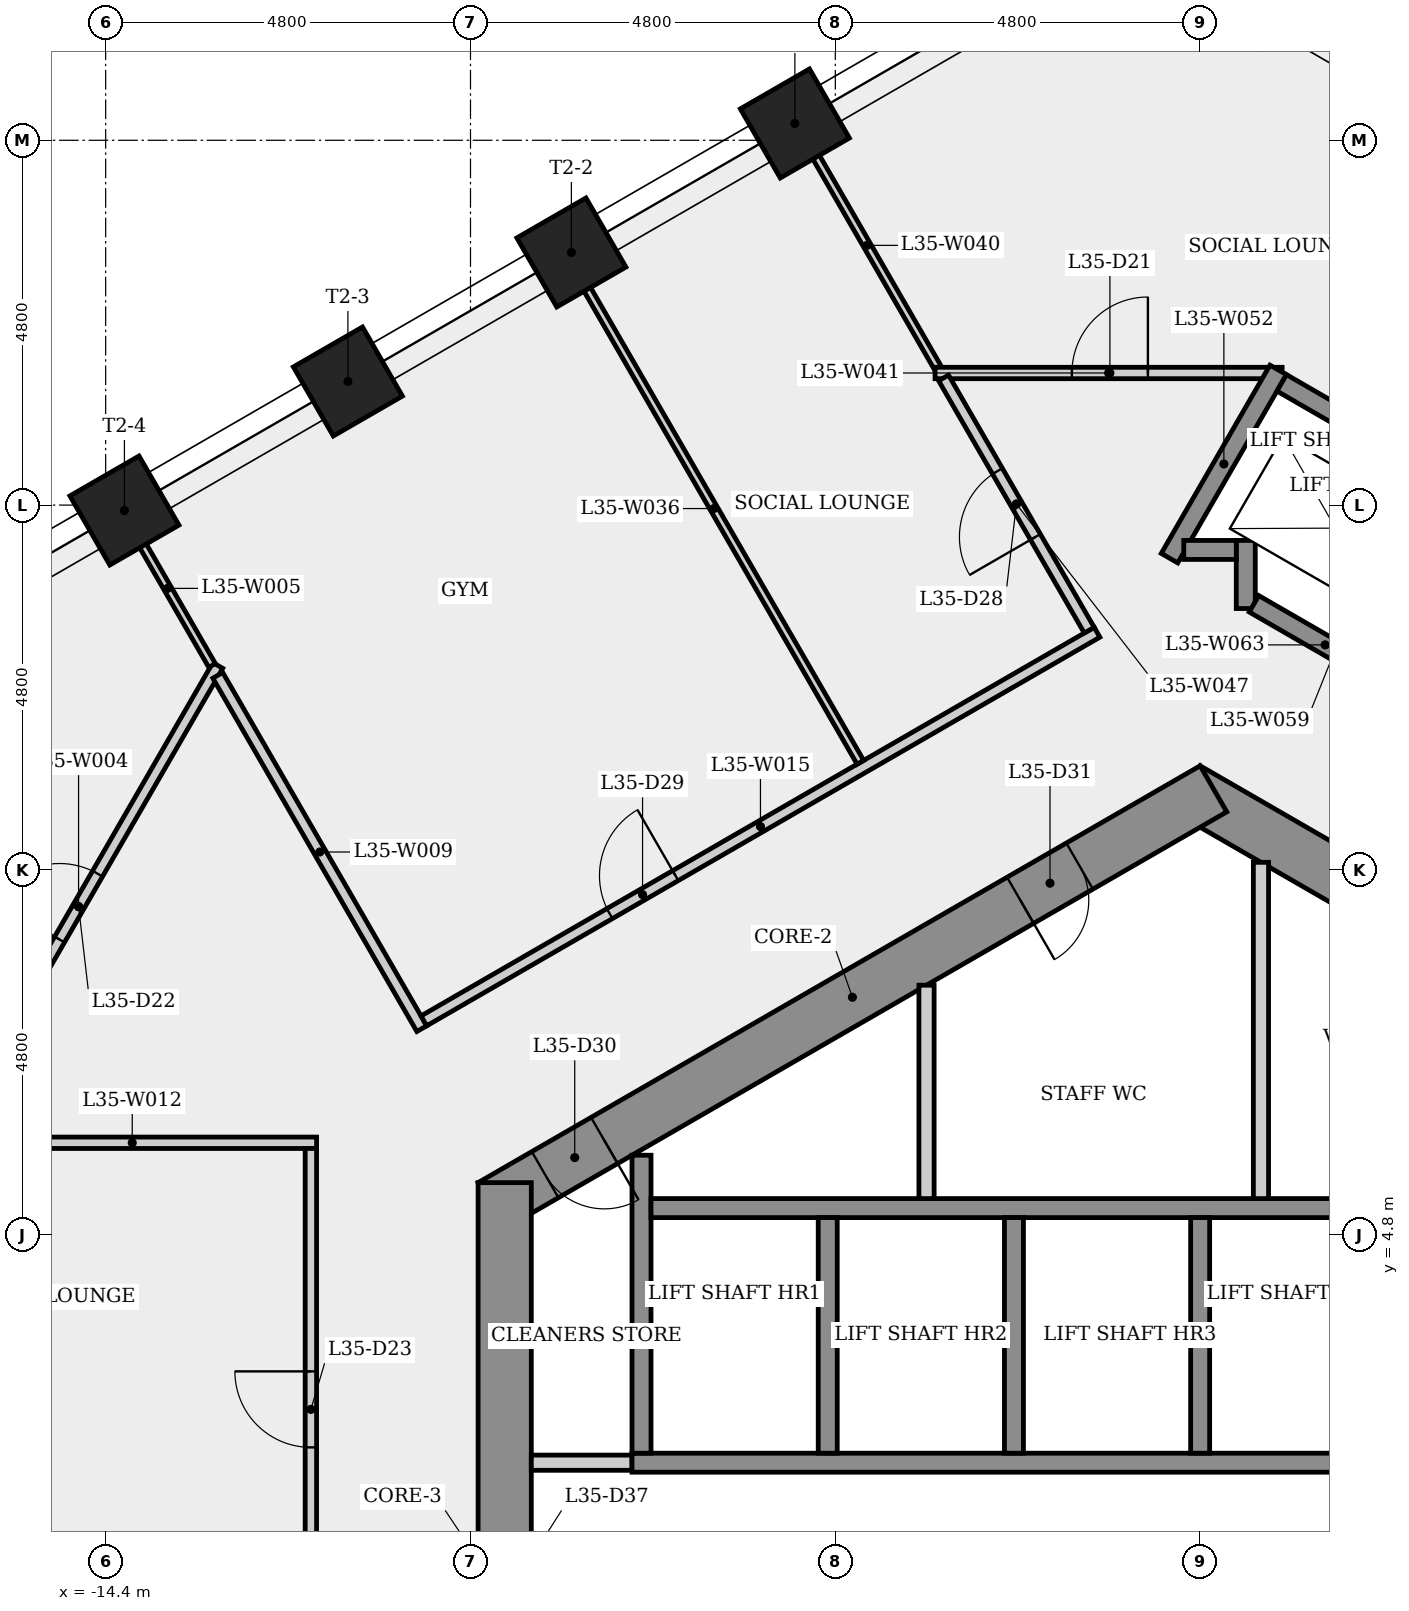
"""IFC4 building model, lengths in metres.
Left out: names, types, materials, properties, quantities, classifications, styles, units other than length and angle.
Written with IfcOpenShell. Run it as: python <this file> out.ifc"""

import sys

from ifc_helpers import new_model, si_unit, direction, frame, frame_2d, origin, origin_2d, place, context, subcontext, project, spatial, rectangle, extrude, element, fill, save


model = new_model("IFC4")
c1 = context("Model", 3, precision=1e-05, world=origin(), true_north=direction((0.0, 1.0)))
c2 = subcontext(c1, "Body", "Model", "MODEL_VIEW")
j1 = project(units=[si_unit("LENGTHUNIT", "METRE"), si_unit("PLANEANGLEUNIT", "RADIAN")], contexts=[c1])
p1 = place(None, origin())
s1 = spatial("IfcSite", under=j1, at=p1, CompositionType="ELEMENT")
p2 = place(p1, origin())
s2 = spatial("IfcBuilding", under=s1, at=p2, CompositionType="ELEMENT")
p3 = place(p2, frame((0.0, 0.0, 132.5)))
s3 = spatial("IfcBuildingStorey", under=s2, at=p3, CompositionType="ELEMENT", Elevation=132.5)
p4 = place(p3, frame((9.325, 5.182, 0.0), z_axis=(0.0, 0.0, 1.0), x_axis=(-0.866023993627, 0.500002442456, 0.0)))
e1 = element("IfcWall", 1, at=p4, inside=s3, PredefinedType="SHEAR", context=c2, shape_type="SweptSolid", body=[
    extrude(rectangle(XDim=10.97, YDim=0.7, at=frame_2d((5.485, 0.0))), origin(), (0.0, 0.0, 1.0), 3.4),
])
p5 = place(p4, frame((2.933, 0.0, 0.0)))
e2 = element("IfcOpeningElement", 2, at=p5, cuts=e1, PredefinedType="OPENING", context=c2, shape_type="SweptSolid", body=[
    extrude(rectangle(XDim=0.9, YDim=2.1, at=frame_2d((0.45, 1.05))), frame((0.0, 0.36, 0.0), z_axis=(0.0, -1.0, 0.0), x_axis=(1.0, 0.0, 0.0)), (0.0, 0.0, 1.0), 0.72),
])
p6 = place(p3, frame((0.175, 10.667, 0.0), z_axis=(0.0, 0.0, 1.0), x_axis=(-0.866023993627, -0.500002442456, 0.0)))
e3 = element("IfcWall", 3, at=p6, inside=s3, PredefinedType="SHEAR", context=c2, shape_type="SweptSolid", body=[
    extrude(rectangle(XDim=10.97, YDim=0.7, at=frame_2d((5.485, 0.0))), origin(), (0.0, 0.0, 1.0), 3.4),
])
p7 = place(p6, frame((9.254, 0.0, 0.0)))
e4 = element("IfcOpeningElement", 4, at=p7, cuts=e3, PredefinedType="OPENING", context=c2, shape_type="SweptSolid", body=[
    extrude(rectangle(XDim=0.9, YDim=2.1, at=frame_2d((0.45, 1.05))), frame((0.0, 0.36, 0.0), z_axis=(0.0, -1.0, 0.0), x_axis=(1.0, 0.0, 0.0)), (0.0, 0.0, 1.0), 0.72),
])
p8 = place(p6, frame((2.033, 0.0, 0.0)))
e5 = element("IfcOpeningElement", 5, at=p8, cuts=e3, PredefinedType="OPENING", context=c2, shape_type="SweptSolid", body=[
    extrude(rectangle(XDim=0.9, YDim=2.1, at=frame_2d((0.45, 1.05))), frame((0.0, 0.36, 0.0), z_axis=(0.0, -1.0, 0.0), x_axis=(1.0, 0.0, 0.0)), (0.0, 0.0, 1.0), 0.72),
])
p9 = place(p3, frame((-9.15, 5.485, 0.0), z_axis=(0.0, 0.0, 1.0), x_axis=(0.0, -1.0, 0.0)))
e6 = element("IfcWall", 6, at=p9, inside=s3, PredefinedType="SHEAR", context=c2, shape_type="SweptSolid", body=[
    extrude(rectangle(XDim=10.97, YDim=0.7, at=frame_2d((5.485, 0.0))), origin(), (0.0, 0.0, 1.0), 3.4),
])
p10 = place(p9, frame((4.685, 0.0, 0.0)))
e7 = element("IfcOpeningElement", 7, at=p10, cuts=e6, PredefinedType="OPENING", context=c2, shape_type="SweptSolid", body=[
    extrude(rectangle(XDim=1.6, YDim=2.1, at=frame_2d((0.8, 1.05))), frame((0.0, 0.36, 0.0), z_axis=(0.0, -1.0, 0.0), x_axis=(1.0, 0.0, 0.0)), (0.0, 0.0, 1.0), 0.72),
])
for number, where, z_axis, x_axis in (
    (8, (-5.332, 19.421, 0.0), (0.0, 0.0, 1.0), (-0.5, 0.866, 0.0)),
    (9, (-8.273, 17.724, 0.0), (0.0, 0.0, 1.0), (-0.5, 0.866, 0.0)),
    (10, (-11.213, 16.026, 0.0), (0.0, 0.0, 1.0), (-0.5, 0.866, 0.0)),
    (11, (-14.153, 14.329, 0.0), (0.0, 0.0, 1.0), (-0.5, 0.866, 0.0)),
):
    element("IfcColumn", number, at=place(p3, frame(where, z_axis=z_axis, x_axis=x_axis)), inside=s3, PredefinedType="COLUMN", context=c2, shape_type="SweptSolid", body=[
        extrude(rectangle(XDim=1.05, YDim=1.05, at=origin_2d()), origin(), (0.0, 0.0, 1.0), 3.4),
    ])
p11 = place(p3, frame((-16.588, 5.945, 0.0), z_axis=(0.0, 0.0, 1.0), x_axis=(0.500006094381, 0.866021885163, 0.0)))
e12 = element("IfcWall", 12, at=p11, inside=s3, PredefinedType="PARTITIONING", context=c2, shape_type="SweptSolid", body=[
    extrude(rectangle(XDim=7.327, YDim=0.15, at=frame_2d((3.663, 0.0))), origin(), (0.0, 0.0, 1.0), 3.0),
])
p12 = place(p11, frame((3.163, 0.0, 0.0)))
e13 = element("IfcOpeningElement", 13, at=p12, cuts=e12, PredefinedType="OPENING", context=c2, shape_type="SweptSolid", body=[
    extrude(rectangle(XDim=1.0, YDim=2.1, at=frame_2d((0.5, 1.05))), frame((0.0, 0.085, 0.0), z_axis=(0.0, -1.0, 0.0), x_axis=(1.0, 0.0, 0.0)), (0.0, 0.0, 1.0), 0.17),
])
p13 = place(p3, frame((-14.171, 14.318, 0.0), z_axis=(0.0, 0.0, 1.0), x_axis=(0.500017137554, -0.866015509187, 0.0)))
e14 = element("IfcWall", 14, at=p13, inside=s3, PredefinedType="PARTITIONING", context=c2, shape_type="SweptSolid", body=[
    extrude(rectangle(XDim=2.343, YDim=0.1, at=frame_2d((1.171, 0.0))), origin(), (0.0, 0.0, 1.0), 3.0),
])
p14 = place(p3, frame((-12.925, 12.16, 0.0), z_axis=(0.0, 0.0, 1.0), x_axis=(0.500022974468, -0.866012139063, 0.0)))
e15 = element("IfcWall", 15, at=p14, inside=s3, PredefinedType="PARTITIONING", context=c2, shape_type="SweptSolid", body=[
    extrude(rectangle(XDim=5.368, YDim=0.15, at=frame_2d((2.684, 0.0))), origin(), (0.0, 0.0, 1.0), 3.0),
])
p15 = place(p3, frame((-11.625, 6.01, 0.0), z_axis=(0.0, 0.0, 1.0), x_axis=(-1.0, 0.0, 0.0)))
e16 = element("IfcWall", 16, at=p15, inside=s3, PredefinedType="PARTITIONING", context=c2, shape_type="SweptSolid", body=[
    extrude(rectangle(XDim=4.851, YDim=0.15, at=frame_2d((2.425, 0.0))), origin(), (0.0, 0.0, 1.0), 3.0),
])
p16 = place(p3, frame((-11.7, -6.01, 0.0), z_axis=(0.0, 0.0, 1.0), x_axis=(0.0, 1.0, 0.0)))
e17 = element("IfcWall", 17, at=p16, inside=s3, PredefinedType="PARTITIONING", context=c2, shape_type="SweptSolid", body=[
    extrude(rectangle(XDim=11.944, YDim=0.15, at=frame_2d((5.972, 0.0))), origin(), (0.0, 0.0, 1.0), 3.0),
])
p17 = place(p16, frame((8.011, 0.0, 0.0)))
e18 = element("IfcOpeningElement", 18, at=p17, cuts=e17, PredefinedType="OPENING", context=c2, shape_type="SweptSolid", body=[
    extrude(rectangle(XDim=1.0, YDim=2.1, at=frame_2d((0.5, 1.05))), frame((0.0, 0.085, 0.0), z_axis=(0.0, -1.0, 0.0), x_axis=(1.0, 0.0, 0.0)), (0.0, 0.0, 1.0), 0.17),
])
p18 = place(p16, frame((2.009, 0.0, 0.0)))
e19 = element("IfcOpeningElement", 19, at=p18, cuts=e17, PredefinedType="OPENING", context=c2, shape_type="SweptSolid", body=[
    extrude(rectangle(XDim=1.0, YDim=2.1, at=frame_2d((0.5, 1.05))), frame((0.0, 0.085, 0.0), z_axis=(0.0, -1.0, 0.0), x_axis=(1.0, 0.0, 0.0)), (0.0, 0.0, 1.0), 0.17),
])
p19 = place(p3, frame((-10.213, 7.613, 0.0), z_axis=(0.0, 0.0, 1.0), x_axis=(0.866020604402, 0.500008312683, 0.0)))
e20 = element("IfcWall", 20, at=p19, inside=s3, PredefinedType="PARTITIONING", context=c2, shape_type="SweptSolid", body=[
    extrude(rectangle(XDim=10.227, YDim=0.15, at=frame_2d((5.113, 0.0))), origin(), (0.0, 0.0, 1.0), 3.0),
])
p20 = place(p19, frame((2.822, 0.0, 0.0)))
e21 = element("IfcOpeningElement", 21, at=p20, cuts=e20, PredefinedType="OPENING", context=c2, shape_type="SweptSolid", body=[
    extrude(rectangle(XDim=1.0, YDim=2.1, at=frame_2d((0.5, 1.05))), frame((0.0, 0.085, 0.0), z_axis=(0.0, -1.0, 0.0), x_axis=(1.0, 0.0, 0.0)), (0.0, 0.0, 1.0), 0.17),
])
p21 = place(p3, frame((-8.8, 1.8, 0.0), z_axis=(0.0, 0.0, 1.0), x_axis=(1.0, 0.0, 0.0)))
e22 = element("IfcWall", 22, at=p21, inside=s3, PredefinedType="PARTITIONING", context=c2, shape_type="SweptSolid", body=[
    extrude(rectangle(XDim=1.325, YDim=0.2, at=frame_2d((0.663, 0.0))), origin(), (0.0, 0.0, 1.0), 3.0),
])
p22 = place(p3, frame((-7.475, 1.8, 0.0), z_axis=(0.0, 0.0, 1.0), x_axis=(1.0, 0.0, 0.0)))
e23 = element("IfcWall", 23, at=p22, inside=s3, PredefinedType="SHEAR", context=c2, shape_type="SweptSolid", body=[
    extrude(rectangle(XDim=14.95, YDim=0.25, at=frame_2d((7.475, 0.0))), origin(), (0.0, 0.0, 1.0), 3.0),
])
p23 = place(p3, frame((-7.35, 1.925, 0.0), z_axis=(0.0, 0.0, 1.0), x_axis=(0.0, 1.0, 0.0)))
e24 = element("IfcWall", 24, at=p23, inside=s3, PredefinedType="SHEAR", context=c2, shape_type="SweptSolid", body=[
    extrude(rectangle(XDim=3.921, YDim=0.25, at=frame_2d((1.96, 0.0))), origin(), (0.0, 0.0, 1.0), 3.0),
])
p24 = place(p3, frame((-7.225, 5.15, 0.0), z_axis=(0.0, 0.0, 1.0), x_axis=(1.0, 0.0, 0.0)))
e25 = element("IfcWall", 25, at=p24, inside=s3, PredefinedType="SHEAR", context=c2, shape_type="SweptSolid", body=[
    extrude(rectangle(XDim=14.7, YDim=0.25, at=frame_2d((7.35, 0.0))), origin(), (0.0, 0.0, 1.0), 3.0),
])
p25 = place(p3, frame((-4.9, 5.025, 0.0), z_axis=(0.0, 0.0, 1.0), x_axis=(0.0, -1.0, 0.0)))
e26 = element("IfcWall", 26, at=p25, inside=s3, PredefinedType="SHEAR", context=c2, shape_type="SweptSolid", body=[
    extrude(rectangle(XDim=3.1, YDim=0.25, at=frame_2d((1.55, 0.0))), origin(), (0.0, 0.0, 1.0), 3.4),
])
p26 = place(p3, frame((-4.47, 11.016, 0.0), z_axis=(0.0, 0.0, 1.0), x_axis=(-0.499997453958, 0.866026873738, 0.0)))
e27 = element("IfcWall", 27, at=p26, inside=s3, PredefinedType="PARTITIONING", context=c2, shape_type="SweptSolid", body=[
    extrude(rectangle(XDim=7.71, YDim=0.1, at=frame_2d((3.855, 0.0))), origin(), (0.0, 0.0, 1.0), 3.0),
])
p27 = place(p3, frame((-3.6, 8.083, 0.0), z_axis=(0.0, 0.0, 1.0), x_axis=(0.0, -1.0, 0.0)))
e28 = element("IfcWall", 28, at=p27, inside=s3, PredefinedType="PARTITIONING", context=c2, shape_type="SweptSolid", body=[
    extrude(rectangle(XDim=2.808, YDim=0.2, at=frame_2d((1.404, 0.0))), origin(), (0.0, 0.0, 1.0), 3.0),
])
p28 = place(p3, frame((-3.45, 16.203, 0.0), z_axis=(0.0, 0.0, 1.0), x_axis=(-0.499977539641, 0.866038370891, 0.0)))
e29 = element("IfcWall", 29, at=p28, inside=s3, PredefinedType="PARTITIONING", context=c2, shape_type="SweptSolid", body=[
    extrude(rectangle(XDim=3.728, YDim=0.1, at=frame_2d((1.864, 0.0))), origin(), (0.0, 0.0, 1.0), 3.0),
])
p29 = place(p3, frame((-3.488, 16.138, 0.0), z_axis=(0.0, 0.0, 1.0), x_axis=(1.0, 0.0, 0.0)))
e30 = element("IfcWall", 30, at=p29, inside=s3, PredefinedType="PARTITIONING", context=c2, shape_type="SweptSolid", body=[
    extrude(rectangle(XDim=4.566, YDim=0.15, at=frame_2d((2.283, 0.0))), origin(), (0.0, 0.0, 1.0), 3.0),
])
p30 = place(p29, frame((1.801, 0.0, 0.0)))
e31 = element("IfcOpeningElement", 31, at=p30, cuts=e30, PredefinedType="OPENING", context=c2, shape_type="SweptSolid", body=[
    extrude(rectangle(XDim=1.0, YDim=2.1, at=frame_2d((0.5, 1.05))), frame((0.0, 0.085, 0.0), z_axis=(0.0, -1.0, 0.0), x_axis=(1.0, 0.0, 0.0)), (0.0, 0.0, 1.0), 0.17),
])
p31 = place(p3, frame((-2.45, 5.025, 0.0), z_axis=(0.0, 0.0, 1.0), x_axis=(0.0, -1.0, 0.0)))
e32 = element("IfcWall", 32, at=p31, inside=s3, PredefinedType="SHEAR", context=c2, shape_type="SweptSolid", body=[
    extrude(rectangle(XDim=3.1, YDim=0.25, at=frame_2d((1.55, 0.0))), origin(), (0.0, 0.0, 1.0), 3.4),
])
p32 = place(p3, frame((-1.459, 12.754, 0.0), z_axis=(0.0, 0.0, 1.0), x_axis=(-0.500023910398, 0.866011598669, 0.0)))
e33 = element("IfcWall", 33, at=p32, inside=s3, PredefinedType="PARTITIONING", context=c2, shape_type="SweptSolid", body=[
    extrude(rectangle(XDim=3.832, YDim=0.15, at=frame_2d((1.916, 0.0))), origin(), (0.0, 0.0, 1.0), 3.0),
])
p33 = place(p32, frame((1.416, 0.0, 0.0)))
e34 = element("IfcOpeningElement", 34, at=p33, cuts=e33, PredefinedType="OPENING", context=c2, shape_type="SweptSolid", body=[
    extrude(rectangle(XDim=1.0, YDim=2.1, at=frame_2d((0.5, 1.05))), frame((0.0, 0.085, 0.0), z_axis=(0.0, -1.0, 0.0), x_axis=(1.0, 0.0, 0.0)), (0.0, 0.0, 1.0), 0.17),
])
p34 = place(p3, frame((-0.403, 13.702, 0.0), z_axis=(0.0, 0.0, 1.0), x_axis=(0.499976111731, 0.866039195244, 0.0)))
e35 = element("IfcWall", 35, at=p34, inside=s3, PredefinedType="SHEAR", context=c2, shape_type="SweptSolid", body=[
    extrude(rectangle(XDim=2.861, YDim=0.25, at=frame_2d((1.43, 0.0))), origin(), (0.0, 0.0, 1.0), 3.0),
])
p35 = place(p3, frame((0.0, 5.025, 0.0), z_axis=(0.0, 0.0, 1.0), x_axis=(0.0, -1.0, 0.0)))
e36 = element("IfcWall", 36, at=p35, inside=s3, PredefinedType="SHEAR", context=c2, shape_type="SweptSolid", body=[
    extrude(rectangle(XDim=3.1, YDim=0.25, at=frame_2d((1.55, 0.0))), origin(), (0.0, 0.0, 1.0), 3.4),
])
p36 = place(p3, frame((0.6, 13.039, 0.0), z_axis=(0.0, 0.0, 1.0), x_axis=(0.0, 1.0, 0.0)))
e37 = element("IfcWall", 37, at=p36, inside=s3, PredefinedType="SHEAR", context=c2, shape_type="SweptSolid", body=[
    extrude(rectangle(XDim=0.896, YDim=0.25, at=frame_2d((0.448, 0.0))), origin(), (0.0, 0.0, 1.0), 3.0),
])
p37 = place(p3, frame((0.475, 13.81, 0.0), z_axis=(0.0, 0.0, 1.0), x_axis=(-1.0, 0.0, 0.0)))
e38 = element("IfcWall", 38, at=p37, inside=s3, PredefinedType="SHEAR", context=c2, shape_type="SweptSolid", body=[
    extrude(rectangle(XDim=0.691, YDim=0.25, at=frame_2d((0.345, 0.0))), origin(), (0.0, 0.0, 1.0), 3.4),
])
p38 = place(p3, frame((0.8, 9.699, 0.0), z_axis=(0.0, 0.0, 1.0), x_axis=(0.0, -1.0, 0.0)))
e39 = element("IfcWall", 39, at=p38, inside=s3, PredefinedType="PARTITIONING", context=c2, shape_type="SweptSolid", body=[
    extrude(rectangle(XDim=4.425, YDim=0.2, at=frame_2d((2.212, 0.0))), origin(), (0.0, 0.0, 1.0), 3.0),
])
p39 = place(p3, frame((1.073, 16.008, 0.0), z_axis=(0.0, 0.0, 1.0), x_axis=(0.866040211805, -0.499974350878, 0.0)))
e40 = element("IfcWall", 40, at=p39, inside=s3, PredefinedType="SHEAR", context=c2, shape_type="SweptSolid", body=[
    extrude(rectangle(XDim=3.3, YDim=0.25, at=frame_2d((1.65, 0.0))), origin(), (0.0, 0.0, 1.0), 3.0),
])
p40 = place(p3, frame((2.581, 12.02, 0.0), z_axis=(0.0, 0.0, 1.0), x_axis=(-0.86603892542, 0.499976579108, 0.0)))
e41 = element("IfcWall", 41, at=p40, inside=s3, PredefinedType="SHEAR", context=c2, shape_type="SweptSolid", body=[
    extrude(rectangle(XDim=2.162, YDim=0.25, at=frame_2d((1.081, 0.0))), origin(), (0.0, 0.0, 1.0), 3.0),
])
p41 = place(p30, origin())
e42 = element("IfcDoor", 42, at=p41, inside=s3, OperationType="SINGLE_SWING_RIGHT", PredefinedType="DOOR", context=c2, shape_type="SweptSolid", body=[
    extrude(rectangle(XDim=1.0, YDim=2.1, at=frame_2d((0.5, 1.05))), frame((0.0, 0.025, 0.0), z_axis=(0.0, -1.0, 0.0), x_axis=(1.0, 0.0, 0.0)), (0.0, 0.0, 1.0), 0.05),
])
fill(e31, e42)
p42 = place(p12, origin())
e43 = element("IfcDoor", 43, at=p42, inside=s3, OperationType="SINGLE_SWING_LEFT", PredefinedType="DOOR", context=c2, shape_type="SweptSolid", body=[
    extrude(rectangle(XDim=1.0, YDim=2.1, at=frame_2d((0.5, 1.05))), frame((0.0, 0.025, 0.0), z_axis=(0.0, -1.0, 0.0), x_axis=(1.0, 0.0, 0.0)), (0.0, 0.0, 1.0), 0.05),
])
fill(e13, e43)
p43 = place(p17, origin())
e44 = element("IfcDoor", 44, at=p43, inside=s3, OperationType="SINGLE_SWING_RIGHT", PredefinedType="DOOR", context=c2, shape_type="SweptSolid", body=[
    extrude(rectangle(XDim=1.0, YDim=2.1, at=frame_2d((0.5, 1.05))), frame((0.0, 0.025, 0.0), z_axis=(0.0, -1.0, 0.0), x_axis=(1.0, 0.0, 0.0)), (0.0, 0.0, 1.0), 0.05),
])
fill(e18, e44)
p44 = place(p33, origin())
e45 = element("IfcDoor", 45, at=p44, inside=s3, OperationType="SINGLE_SWING_LEFT", PredefinedType="DOOR", context=c2, shape_type="SweptSolid", body=[
    extrude(rectangle(XDim=1.0, YDim=2.1, at=frame_2d((0.5, 1.05))), frame((0.0, 0.025, 0.0), z_axis=(0.0, -1.0, 0.0), x_axis=(1.0, 0.0, 0.0)), (0.0, 0.0, 1.0), 0.05),
])
fill(e34, e45)
p45 = place(p20, origin())
e46 = element("IfcDoor", 46, at=p45, inside=s3, OperationType="SINGLE_SWING_RIGHT", PredefinedType="DOOR", context=c2, shape_type="SweptSolid", body=[
    extrude(rectangle(XDim=1.0, YDim=2.1, at=frame_2d((0.5, 1.05))), frame((0.0, 0.025, 0.0), z_axis=(0.0, -1.0, 0.0), x_axis=(1.0, 0.0, 0.0)), (0.0, 0.0, 1.0), 0.05),
])
fill(e21, e46)
p46 = place(p7, origin())
e47 = element("IfcDoor", 47, at=p46, inside=s3, OperationType="SINGLE_SWING_LEFT", PredefinedType="DOOR", context=c2, shape_type="SweptSolid", body=[
    extrude(rectangle(XDim=0.9, YDim=2.1, at=frame_2d((0.45, 1.05))), frame((0.0, 0.025, 0.0), z_axis=(0.0, -1.0, 0.0), x_axis=(1.0, 0.0, 0.0)), (0.0, 0.0, 1.0), 0.05),
])
fill(e4, e47)
p47 = place(p8, origin())
e48 = element("IfcDoor", 48, at=p47, inside=s3, OperationType="SINGLE_SWING_RIGHT", PredefinedType="DOOR", context=c2, shape_type="SweptSolid", body=[
    extrude(rectangle(XDim=0.9, YDim=2.1, at=frame_2d((0.45, 1.05))), frame((0.0, 0.025, 0.0), z_axis=(0.0, -1.0, 0.0), x_axis=(1.0, 0.0, 0.0)), (0.0, 0.0, 1.0), 0.05),
])
fill(e5, e48)
save(model, sys.argv[1])
